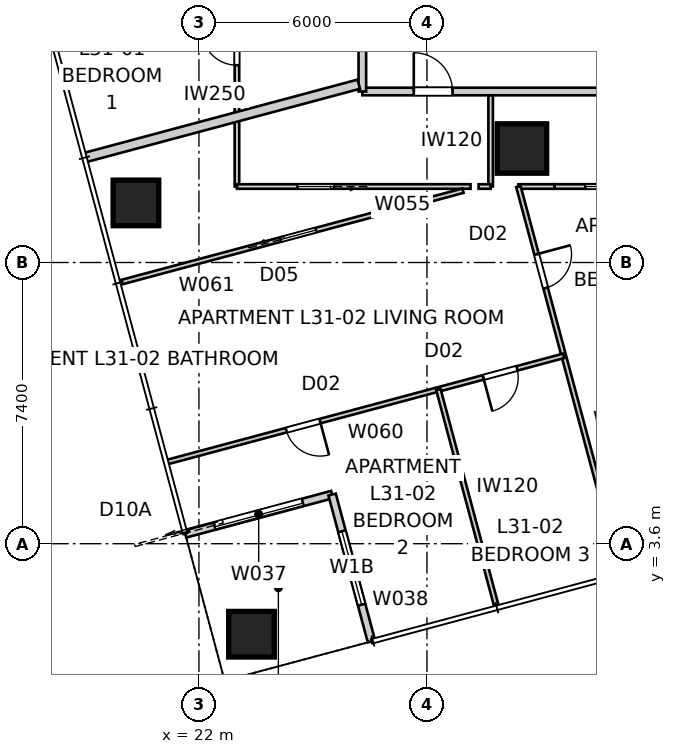
"""IFC4 building model, lengths in metres.
Left out: names, types, materials, properties, quantities, classifications, styles, units other than length and angle.
Written with IfcOpenShell. Run it as: python <this file> out.ifc"""

import sys

from ifc_helpers import new_model, si_unit, direction, frame, frame_2d, origin, origin_2d, place, context, subcontext, project, spatial, rectangle, extrude, element, fill, save


model = new_model("IFC4")
c1 = context("Model", 3, precision=1e-05, world=origin(), true_north=direction((0.0, 1.0)))
c2 = subcontext(c1, "Body", "Model", "MODEL_VIEW")
j1 = project(units=[si_unit("LENGTHUNIT", "METRE"), si_unit("PLANEANGLEUNIT", "RADIAN")], contexts=[c1])
p1 = place(None, origin())
s1 = spatial("IfcSite", under=j1, at=p1, CompositionType="ELEMENT")
p2 = place(p1, origin())
s2 = spatial("IfcBuilding", under=s1, at=p2, CompositionType="ELEMENT")
p3 = place(p2, frame((0.0, 0.0, 115.0)))
s3 = spatial("IfcBuildingStorey", under=s2, at=p3, CompositionType="ELEMENT", Elevation=115.0)
for number, where, z_axis, x_axis in (
    (1, (23.383, 1.219, 0.0), (0.0, 0.0, 1.0), (1.0, 0.0, 0.0)),
    (2, (20.342, 12.568, 0.0), (0.0, 0.0, 1.0), (1.0, 0.0, 0.0)),
):
    element("IfcColumn", number, at=place(p3, frame(where, z_axis=z_axis, x_axis=x_axis)), inside=s3, PredefinedType="COLUMN", context=c2, shape_type="SweptSolid", body=[
        extrude(rectangle(XDim=1.2, YDim=1.2, at=origin_2d()), origin(), (0.0, 0.0, 1.0), 3.4),
    ])
p4 = place(p3, frame((30.5, 14.0, 0.0), z_axis=(0.0, 0.0, 1.0), x_axis=(1.0, 0.0, 0.0)))
e3 = element("IfcColumn", 3, at=p4, inside=s3, PredefinedType="COLUMN", context=c2, shape_type="SweptSolid", body=[
    extrude(rectangle(XDim=1.3, YDim=1.3, at=origin_2d()), origin(), (0.0, 0.0, 1.0), 3.4),
])
p5 = place(p3, frame((21.641, 3.857, 0.0), z_axis=(0.0, 0.0, 1.0), x_axis=(0.965919172068, 0.258843877716, 0.0)))
e4 = element("IfcWall", 4, at=p5, inside=s3, PredefinedType="SOLIDWALL", context=c2, shape_type="SweptSolid", body=[
    extrude(rectangle(XDim=4.0, YDim=0.2, at=frame_2d((2.0, 0.0))), origin(), (0.0, 0.0, 1.0), 3.25),
])
p6 = place(p5, frame((0.8, 0.0, 0.0)))
e5 = element("IfcOpeningElement", 5, at=p6, cuts=e4, PredefinedType="OPENING", context=c2, shape_type="SweptSolid", body=[
    extrude(rectangle(XDim=2.4, YDim=2.1, at=frame_2d((1.2, 1.05))), frame((0.0, 0.11, 0.0), z_axis=(0.0, -1.0, 0.0), x_axis=(1.0, 0.0, 0.0)), (0.0, 0.0, 1.0), 0.22),
])
p7 = place(p3, frame((25.504, 4.893, 0.0), z_axis=(0.0, 0.0, 1.0), x_axis=(0.258786931944, -0.965934430412, 0.0)))
e6 = element("IfcWall", 6, at=p7, inside=s3, PredefinedType="SOLIDWALL", context=c2, shape_type="SweptSolid", body=[
    extrude(rectangle(XDim=4.0, YDim=0.2, at=frame_2d((2.0, 0.0))), origin(), (0.0, 0.0, 1.0), 3.25),
])
p8 = place(p7, frame((1.0, 0.0, 0.45)))
e7 = element("IfcOpeningElement", 7, at=p8, cuts=e6, PredefinedType="OPENING", context=c2, shape_type="SweptSolid", body=[
    extrude(rectangle(XDim=2.0, YDim=1.8, at=frame_2d((1.0, 0.9))), frame((0.0, 0.11, 0.0), z_axis=(0.0, -1.0, 0.0), x_axis=(1.0, 0.0, 0.0)), (0.0, 0.0, 1.0), 0.22),
])
p9 = place(p3, frame((26.3, 15.5, 0.0), z_axis=(0.0, 0.0, 1.0), x_axis=(1.0, 0.0, 0.0)))
e8 = element("IfcWall", 8, at=p9, inside=s3, PredefinedType="PARTITIONING", context=c2, shape_type="SweptSolid", body=[
    extrude(rectangle(XDim=28.2, YDim=0.2, at=frame_2d((14.1, 0.0))), origin(), (0.0, 0.0, 1.0), 3.25),
])
p10 = place(p9, frame((21.474, 0.0, 0.0)))
e9 = element("IfcOpeningElement", 9, at=p10, cuts=e8, PredefinedType="OPENING", context=c2, shape_type="SweptSolid", body=[
    extrude(rectangle(XDim=1.02, YDim=2.34, at=frame_2d((0.51, 1.17))), frame((0.0, 0.11, 0.0), z_axis=(0.0, -1.0, 0.0), x_axis=(1.0, 0.0, 0.0)), (0.0, 0.0, 1.0), 0.22),
])
p11 = place(p9, frame((1.353, 0.0, 0.0)))
e10 = element("IfcOpeningElement", 10, at=p11, cuts=e8, PredefinedType="OPENING", context=c2, shape_type="SweptSolid", body=[
    extrude(rectangle(XDim=1.02, YDim=2.1, at=frame_2d((0.51, 1.05))), frame((0.0, 0.11, 0.0), z_axis=(0.0, -1.0, 0.0), x_axis=(1.0, 0.0, 0.0)), (0.0, 0.0, 1.0), 0.22),
])
p12 = place(p3, frame((26.3, 42.52, 0.0), z_axis=(0.0, 0.0, 1.0), x_axis=(0.0, -1.0, 0.0)))
e11 = element("IfcWall", 11, at=p12, inside=s3, PredefinedType="PARTITIONING", context=c2, shape_type="SweptSolid", body=[
    extrude(rectangle(XDim=27.02, YDim=0.2, at=frame_2d((13.51, 0.0))), origin(), (0.0, 0.0, 1.0), 3.25),
])
p13 = place(p12, frame((23.584, 0.0, 0.0)))
e12 = element("IfcOpeningElement", 12, at=p13, cuts=e11, PredefinedType="OPENING", context=c2, shape_type="SweptSolid", body=[
    extrude(rectangle(XDim=1.02, YDim=2.1, at=frame_2d((0.51, 1.05))), frame((0.0, 0.11, 0.0), z_axis=(0.0, -1.0, 0.0), x_axis=(1.0, 0.0, 0.0)), (0.0, 0.0, 1.0), 0.22),
])
p14 = place(p12, frame((13.468, 0.0, 0.0)))
e13 = element("IfcOpeningElement", 13, at=p14, cuts=e11, PredefinedType="OPENING", context=c2, shape_type="SweptSolid", body=[
    extrude(rectangle(XDim=1.02, YDim=2.34, at=frame_2d((0.51, 1.17))), frame((0.0, 0.11, 0.0), z_axis=(0.0, -1.0, 0.0), x_axis=(1.0, 0.0, 0.0)), (0.0, 0.0, 1.0), 0.22),
])
p15 = place(p3, frame((18.988, 13.758, 0.0), z_axis=(0.0, 0.0, 1.0), x_axis=(0.965929532284, 0.258805213744, 0.0)))
e14 = element("IfcWall", 14, at=p15, inside=s3, PredefinedType="PARTITIONING", context=c2, shape_type="SweptSolid", body=[
    extrude(rectangle(XDim=7.473, YDim=0.25, at=frame_2d((3.737, 0.0))), origin(), (0.0, 0.0, 1.0), 3.25),
])
p16 = place(p3, frame((23.0, 13.0, 0.0), z_axis=(0.0, 0.0, 1.0), x_axis=(0.0, 1.0, 0.0)))
e15 = element("IfcWall", 15, at=p16, inside=s3, PredefinedType="PARTITIONING", context=c2, shape_type="SweptSolid", body=[
    extrude(rectangle(XDim=27.64, YDim=0.12, at=frame_2d((13.82, 0.0))), origin(), (0.0, 0.0, 1.0), 2.55),
])
p17 = place(p16, frame((3.192, 0.0, 0.0)))
e16 = element("IfcOpeningElement", 16, at=p17, cuts=e15, PredefinedType="OPENING", context=c2, shape_type="SweptSolid", body=[
    extrude(rectangle(XDim=0.92, YDim=2.34, at=frame_2d((0.46, 1.17))), frame((0.0, 0.07, 0.0), z_axis=(0.0, -1.0, 0.0), x_axis=(1.0, 0.0, 0.0)), (0.0, 0.0, 1.0), 0.14),
])
p18 = place(p16, frame((13.779, 0.0, 0.0)))
e17 = element("IfcOpeningElement", 17, at=p18, cuts=e15, PredefinedType="OPENING", context=c2, shape_type="SweptSolid", body=[
    extrude(rectangle(XDim=0.92, YDim=2.34, at=frame_2d((0.46, 1.17))), frame((0.0, 0.07, 0.0), z_axis=(0.0, -1.0, 0.0), x_axis=(1.0, 0.0, 0.0)), (0.0, 0.0, 1.0), 0.14),
])
p19 = place(p16, frame((16.374, 0.0, 0.0)))
e18 = element("IfcOpeningElement", 18, at=p19, cuts=e15, PredefinedType="OPENING", context=c2, shape_type="SweptSolid", body=[
    extrude(rectangle(XDim=0.92, YDim=2.34, at=frame_2d((0.46, 1.17))), frame((0.0, 0.07, 0.0), z_axis=(0.0, -1.0, 0.0), x_axis=(1.0, 0.0, 0.0)), (0.0, 0.0, 1.0), 0.14),
])
p20 = place(p16, frame((9.743, 0.0, 0.0)))
e19 = element("IfcOpeningElement", 19, at=p20, cuts=e15, PredefinedType="OPENING", context=c2, shape_type="SweptSolid", body=[
    extrude(rectangle(XDim=0.96, YDim=2.1, at=frame_2d((0.48, 1.05))), frame((0.0, 0.07, 0.0), z_axis=(0.0, -1.0, 0.0), x_axis=(1.0, 0.0, 0.0)), (0.0, 0.0, 1.0), 0.14),
])
p21 = place(p16, frame((24.879, 0.0, 0.0)))
e20 = element("IfcOpeningElement", 20, at=p21, cuts=e15, PredefinedType="OPENING", context=c2, shape_type="SweptSolid", body=[
    extrude(rectangle(XDim=0.96, YDim=2.1, at=frame_2d((0.48, 1.05))), frame((0.0, 0.07, 0.0), z_axis=(0.0, -1.0, 0.0), x_axis=(1.0, 0.0, 0.0)), (0.0, 0.0, 1.0), 0.14),
])
p22 = place(p3, frame((29.676, 15.4, 0.0), z_axis=(0.0, 0.0, 1.0), x_axis=(0.0, -1.0, 0.0)))
e21 = element("IfcWall", 21, at=p22, inside=s3, PredefinedType="PARTITIONING", context=c2, shape_type="SweptSolid", body=[
    extrude(rectangle(XDim=2.4, YDim=0.12, at=frame_2d((1.2, 0.0))), origin(), (0.0, 0.0, 1.0), 3.25),
])
p23 = place(p3, frame((29.147, 13.0, 0.0), z_axis=(0.0, 0.0, 1.0), x_axis=(-1.0, 0.0, 0.0)))
e22 = element("IfcWall", 22, at=p23, inside=s3, PredefinedType="PARTITIONING", context=c2, shape_type="SweptSolid", body=[
    extrude(rectangle(XDim=6.147, YDim=0.12, at=frame_2d((3.074, 0.0))), origin(), (0.0, 0.0, 1.0), 3.25),
])
p24 = place(p23, frame((3.591, 0.0, 0.0)))
e23 = element("IfcOpeningElement", 23, at=p24, cuts=e22, PredefinedType="OPENING", context=c2, shape_type="SweptSolid", body=[
    extrude(rectangle(XDim=0.96, YDim=2.1, at=frame_2d((0.48, 1.05))), frame((0.0, 0.07, 0.0), z_axis=(0.0, -1.0, 0.0), x_axis=(1.0, 0.0, 0.0)), (0.0, 0.0, 1.0), 0.14),
])
p25 = place(p3, frame((55.046, 13.0, 0.0), z_axis=(0.0, 0.0, 1.0), x_axis=(-1.0, 0.0, 0.0)))
e24 = element("IfcWall", 24, at=p25, inside=s3, PredefinedType="PARTITIONING", context=c2, shape_type="SweptSolid", body=[
    extrude(rectangle(XDim=23.693, YDim=0.12, at=frame_2d((11.846, 0.0))), origin(), (0.0, 0.0, 1.0), 2.55),
])
p26 = place(p25, frame((8.262, 0.0, 0.0)))
e25 = element("IfcOpeningElement", 25, at=p26, cuts=e24, PredefinedType="OPENING", context=c2, shape_type="SweptSolid", body=[
    extrude(rectangle(XDim=0.92, YDim=2.34, at=frame_2d((0.46, 1.17))), frame((0.0, 0.07, 0.0), z_axis=(0.0, -1.0, 0.0), x_axis=(1.0, 0.0, 0.0)), (0.0, 0.0, 1.0), 0.14),
])
p27 = place(p25, frame((3.825, 0.0, 0.0)))
e26 = element("IfcOpeningElement", 26, at=p27, cuts=e24, PredefinedType="OPENING", context=c2, shape_type="SweptSolid", body=[
    extrude(rectangle(XDim=0.92, YDim=2.34, at=frame_2d((0.46, 1.17))), frame((0.0, 0.07, 0.0), z_axis=(0.0, -1.0, 0.0), x_axis=(1.0, 0.0, 0.0)), (0.0, 0.0, 1.0), 0.14),
])
p28 = place(p25, frame((1.274, 0.0, 0.0)))
e27 = element("IfcOpeningElement", 27, at=p28, cuts=e24, PredefinedType="OPENING", context=c2, shape_type="SweptSolid", body=[
    extrude(rectangle(XDim=0.92, YDim=2.34, at=frame_2d((0.46, 1.17))), frame((0.0, 0.07, 0.0), z_axis=(0.0, -1.0, 0.0), x_axis=(1.0, 0.0, 0.0)), (0.0, 0.0, 1.0), 0.14),
])
p29 = place(p25, frame((13.041, 0.0, 0.0)))
e28 = element("IfcOpeningElement", 28, at=p29, cuts=e24, PredefinedType="OPENING", context=c2, shape_type="SweptSolid", body=[
    extrude(rectangle(XDim=0.96, YDim=2.1, at=frame_2d((0.48, 1.05))), frame((0.0, 0.07, 0.0), z_axis=(0.0, -1.0, 0.0), x_axis=(1.0, 0.0, 0.0)), (0.0, 0.0, 1.0), 0.14),
])
p30 = place(p25, frame((21.917, 0.0, 0.0)))
e29 = element("IfcOpeningElement", 29, at=p30, cuts=e24, PredefinedType="OPENING", context=c2, shape_type="SweptSolid", body=[
    extrude(rectangle(XDim=0.96, YDim=2.1, at=frame_2d((0.48, 1.05))), frame((0.0, 0.07, 0.0), z_axis=(0.0, -1.0, 0.0), x_axis=(1.0, 0.0, 0.0)), (0.0, 0.0, 1.0), 0.14),
])
p31 = place(p3, frame((30.406, 13.0, 0.0), z_axis=(0.0, 0.0, 1.0), x_axis=(0.258797552287, -0.965931585015, 0.0)))
e30 = element("IfcWall", 30, at=p31, inside=s3, PredefinedType="PARTITIONING", context=c2, shape_type="SweptSolid", body=[
    extrude(rectangle(XDim=10.522, YDim=0.12, at=frame_2d((5.261, 0.0))), origin(), (0.0, 0.0, 1.0), 2.722),
])
p32 = place(p31, frame((1.846, 0.0, 0.0)))
e31 = element("IfcOpeningElement", 31, at=p32, cuts=e30, PredefinedType="OPENING", context=c2, shape_type="SweptSolid", body=[
    extrude(rectangle(XDim=0.92, YDim=2.34, at=frame_2d((0.46, 1.17))), frame((0.0, 0.07, 0.0), z_axis=(0.0, -1.0, 0.0), x_axis=(1.0, 0.0, 0.0)), (0.0, 0.0, 1.0), 0.14),
])
p33 = place(p3, frame((31.6, 8.544, 0.0), z_axis=(0.0, 0.0, 1.0), x_axis=(-0.965927151587, -0.258814098973, 0.0)))
e32 = element("IfcWall", 32, at=p33, inside=s3, PredefinedType="PARTITIONING", context=c2, shape_type="SweptSolid", body=[
    extrude(rectangle(XDim=10.793, YDim=0.12, at=frame_2d((5.396, 0.0))), origin(), (0.0, 0.0, 1.0), 3.25),
])
p34 = place(p33, frame((6.64, 0.0, 0.0)))
e33 = element("IfcOpeningElement", 33, at=p34, cuts=e32, PredefinedType="OPENING", context=c2, shape_type="SweptSolid", body=[
    extrude(rectangle(XDim=0.92, YDim=2.34, at=frame_2d((0.46, 1.17))), frame((0.0, 0.07, 0.0), z_axis=(0.0, -1.0, 0.0), x_axis=(1.0, 0.0, 0.0)), (0.0, 0.0, 1.0), 0.14),
])
p35 = place(p33, frame((1.273, 0.0, 0.0)))
e34 = element("IfcOpeningElement", 34, at=p35, cuts=e32, PredefinedType="OPENING", context=c2, shape_type="SweptSolid", body=[
    extrude(rectangle(XDim=0.92, YDim=2.34, at=frame_2d((0.46, 1.17))), frame((0.0, 0.07, 0.0), z_axis=(0.0, -1.0, 0.0), x_axis=(1.0, 0.0, 0.0)), (0.0, 0.0, 1.0), 0.14),
])
p36 = place(p3, frame((19.911, 10.468, 0.0), z_axis=(0.0, 0.0, 1.0), x_axis=(0.965927203676, 0.25881390457, 0.0)))
e35 = element("IfcWall", 35, at=p36, inside=s3, PredefinedType="PARTITIONING", context=c2, shape_type="SweptSolid", body=[
    extrude(rectangle(XDim=9.357, YDim=0.12, at=frame_2d((4.678, 0.0))), origin(), (0.0, 0.0, 1.0), 2.638),
])
p37 = place(p36, frame((4.391, 0.0, 0.0)))
e36 = element("IfcOpeningElement", 36, at=p37, cuts=e35, PredefinedType="OPENING", context=c2, shape_type="SweptSolid", body=[
    extrude(rectangle(XDim=0.96, YDim=2.1, at=frame_2d((0.48, 1.05))), frame((0.0, 0.07, 0.0), z_axis=(0.0, -1.0, 0.0), x_axis=(1.0, 0.0, 0.0)), (0.0, 0.0, 1.0), 0.14),
])
p38 = place(p3, frame((28.3, 7.66, 0.0), z_axis=(0.0, 0.0, 1.0), x_axis=(0.25882212607, -0.965925000741, 0.0)))
e37 = element("IfcWall", 37, at=p38, inside=s3, PredefinedType="PARTITIONING", context=c2, shape_type="SweptSolid", body=[
    extrude(rectangle(XDim=5.91, YDim=0.12, at=frame_2d((2.955, 0.0))), origin(), (0.0, 0.0, 1.0), 3.25),
])
p39 = place(p3, frame((29.676, 13.0, 0.0), z_axis=(0.0, 0.0, 1.0), x_axis=(-1.0, 0.0, 0.0)))
e38 = element("IfcWall", 38, at=p39, inside=s3, PredefinedType="PARTITIONING", context=c2, shape_type="SweptSolid", body=[
    extrude(rectangle(XDim=0.317, YDim=0.12, at=frame_2d((0.158, 0.0))), origin(), (0.0, 0.0, 1.0), 3.25),
])
p40 = place(p3, frame((31.354, 13.0, 0.0), z_axis=(0.0, 0.0, 1.0), x_axis=(-1.0, 0.0, 0.0)))
e39 = element("IfcWall", 39, at=p40, inside=s3, PredefinedType="PARTITIONING", context=c2, shape_type="SweptSolid", body=[
    extrude(rectangle(XDim=0.947, YDim=0.12, at=frame_2d((0.474, 0.0))), origin(), (0.0, 0.0, 1.0), 3.25),
])
p41 = place(p6, origin())
e40 = element("IfcDoor", 40, at=p41, inside=s3, OperationType="SLIDING_TO_LEFT", PredefinedType="DOOR", context=c2, shape_type="SweptSolid", body=[
    extrude(rectangle(XDim=2.4, YDim=2.1, at=frame_2d((1.2, 1.05))), frame((0.0, 0.025, 0.0), z_axis=(0.0, -1.0, 0.0), x_axis=(1.0, 0.0, 0.0)), (0.0, 0.0, 1.0), 0.05),
])
fill(e5, e40)
p42 = place(p8, origin())
e41 = element("IfcWindow", 41, at=p42, inside=s3, PartitioningType="SINGLE_PANEL", PredefinedType="WINDOW", context=c2, shape_type="SweptSolid", body=[
    extrude(rectangle(XDim=2.0, YDim=1.8, at=frame_2d((1.0, 0.9))), frame((0.0, 0.03, 0.0), z_axis=(0.0, -1.0, 0.0), x_axis=(1.0, 0.0, 0.0)), (0.0, 0.0, 1.0), 0.06),
])
fill(e7, e41)
p43 = place(p11, origin())
e42 = element("IfcDoor", 42, at=p43, inside=s3, OperationType="SINGLE_SWING_LEFT", PredefinedType="DOOR", context=c2, shape_type="SweptSolid", body=[
    extrude(rectangle(XDim=1.02, YDim=2.1, at=frame_2d((0.51, 1.05))), frame((0.0, 0.025, 0.0), z_axis=(0.0, -1.0, 0.0), x_axis=(1.0, 0.0, 0.0)), (0.0, 0.0, 1.0), 0.05),
])
fill(e10, e42)
p44 = place(p17, origin())
e43 = element("IfcDoor", 43, at=p44, inside=s3, OperationType="SINGLE_SWING_RIGHT", PredefinedType="DOOR", context=c2, shape_type="SweptSolid", body=[
    extrude(rectangle(XDim=0.92, YDim=2.34, at=frame_2d((0.46, 1.17))), frame((0.0, 0.025, 0.0), z_axis=(0.0, -1.0, 0.0), x_axis=(1.0, 0.0, 0.0)), (0.0, 0.0, 1.0), 0.05),
])
fill(e16, e43)
p45 = place(p24, origin())
e44 = element("IfcDoor", 44, at=p45, inside=s3, OperationType="SLIDING_TO_LEFT", PredefinedType="DOOR", context=c2, shape_type="SweptSolid", body=[
    extrude(rectangle(XDim=0.96, YDim=2.1, at=frame_2d((0.48, 1.05))), frame((0.0, 0.025, 0.0), z_axis=(0.0, -1.0, 0.0), x_axis=(1.0, 0.0, 0.0)), (0.0, 0.0, 1.0), 0.05),
])
fill(e23, e44)
p46 = place(p37, origin())
e45 = element("IfcDoor", 45, at=p46, inside=s3, OperationType="SLIDING_TO_LEFT", PredefinedType="DOOR", context=c2, shape_type="SweptSolid", body=[
    extrude(rectangle(XDim=0.96, YDim=2.1, at=frame_2d((0.48, 1.05))), frame((0.0, 0.025, 0.0), z_axis=(0.0, -1.0, 0.0), x_axis=(1.0, 0.0, 0.0)), (0.0, 0.0, 1.0), 0.05),
])
fill(e36, e45)
p47 = place(p34, origin())
e46 = element("IfcDoor", 46, at=p47, inside=s3, OperationType="SINGLE_SWING_LEFT", PredefinedType="DOOR", context=c2, shape_type="SweptSolid", body=[
    extrude(rectangle(XDim=0.92, YDim=2.34, at=frame_2d((0.46, 1.17))), frame((0.0, 0.025, 0.0), z_axis=(0.0, -1.0, 0.0), x_axis=(1.0, 0.0, 0.0)), (0.0, 0.0, 1.0), 0.05),
])
fill(e33, e46)
p48 = place(p32, origin())
e47 = element("IfcDoor", 47, at=p48, inside=s3, OperationType="SINGLE_SWING_LEFT", PredefinedType="DOOR", context=c2, shape_type="SweptSolid", body=[
    extrude(rectangle(XDim=0.92, YDim=2.34, at=frame_2d((0.46, 1.17))), frame((0.0, 0.025, 0.0), z_axis=(0.0, -1.0, 0.0), x_axis=(1.0, 0.0, 0.0)), (0.0, 0.0, 1.0), 0.05),
])
fill(e31, e47)
p49 = place(p35, origin())
e48 = element("IfcDoor", 48, at=p49, inside=s3, OperationType="SINGLE_SWING_RIGHT", PredefinedType="DOOR", context=c2, shape_type="SweptSolid", body=[
    extrude(rectangle(XDim=0.92, YDim=2.34, at=frame_2d((0.46, 1.17))), frame((0.0, 0.025, 0.0), z_axis=(0.0, -1.0, 0.0), x_axis=(1.0, 0.0, 0.0)), (0.0, 0.0, 1.0), 0.05),
])
fill(e34, e48)
p50 = place(p30, origin())
e49 = element("IfcDoor", 49, at=p50, inside=s3, OperationType="SLIDING_TO_LEFT", PredefinedType="DOOR", context=c2, shape_type="SweptSolid", body=[
    extrude(rectangle(XDim=0.96, YDim=2.1, at=frame_2d((0.48, 1.05))), frame((0.0, 0.025, 0.0), z_axis=(0.0, -1.0, 0.0), x_axis=(1.0, 0.0, 0.0)), (0.0, 0.0, 1.0), 0.05),
])
fill(e29, e49)
save(model, sys.argv[1])
